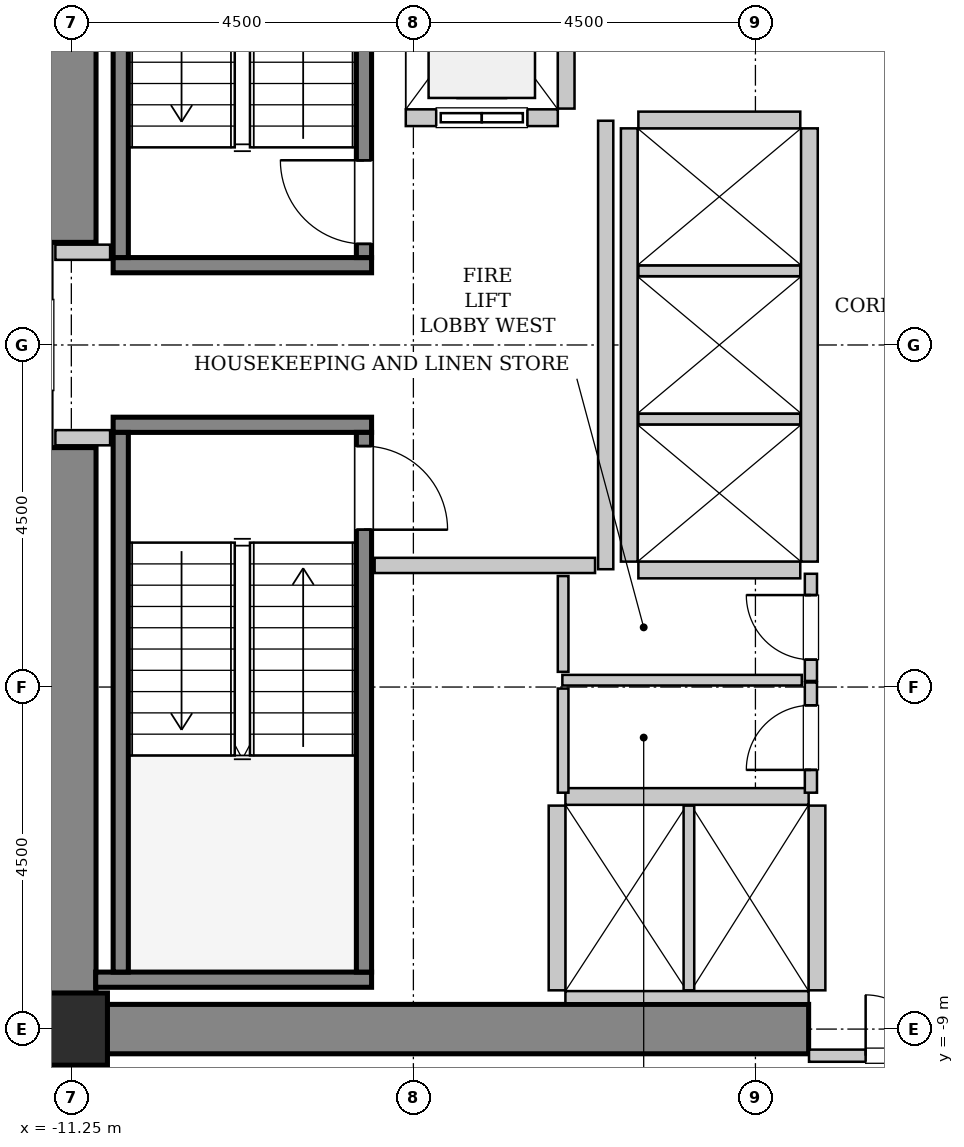
"""IFC4 building model, lengths in metres.
Left out: names, types, materials, properties, quantities, classifications, styles, units other than length and angle.
Written with IfcOpenShell. Run it as: python <this file> out.ifc"""

import sys

from ifc_helpers import new_model, si_unit, direction, frame, frame_2d, origin, origin_2d, place, context, subcontext, project, spatial, rectangle, hollow_rectangle, extrude, source, transform, mapped, element, fill, save


model = new_model("IFC4")
c1 = context("Model", 3, precision=1e-05, world=origin(), true_north=direction((0.0, 1.0)))
c2 = subcontext(c1, "Body", "Model", "MODEL_VIEW")
j1 = project(units=[si_unit("LENGTHUNIT", "METRE"), si_unit("PLANEANGLEUNIT", "RADIAN")], contexts=[c1])
p1 = place(None, origin())
s1 = spatial("IfcSite", under=j1, at=p1, CompositionType="ELEMENT")
p2 = place(p1, origin())
s2 = spatial("IfcBuilding", under=s1, at=p2, CompositionType="ELEMENT")
p3 = place(p2, frame((0.0, 0.0, 40.6)))
s3 = spatial("IfcBuildingStorey", under=s2, at=p3, CompositionType="ELEMENT", Elevation=40.6)
m1 = source(origin(), c2, "Body", "SweptSolid", [
    extrude(rectangle(XDim=10.025, YDim=0.65, at=frame_2d((5.012, 0.0))), origin(), (0.0, 0.0, 1.0), 3.8),
])
p4 = place(p3, frame((-11.575, -9.0, 0.0), z_axis=(0.0, 0.0, 1.0), x_axis=(1.0, 0.0, 0.0)))
e1 = element("IfcWall", 1, at=p4, inside=s3, PredefinedType="SHEAR", context=c2, shape_type="MappedRepresentation", body=[
    mapped(m1, transform((0.0, 0.0, 0.0), x_axis=(1.0, 0.0, 0.0), y_axis=(0.0, 1.0, 0.0), z_axis=(0.0, 0.0, 1.0), scale=1.0)),
])
m2 = source(origin(), c2, "Body", "SweptSolid", [
    extrude(rectangle(XDim=7.325, YDim=0.65, at=frame_2d((3.663, 0.0))), origin(), (0.0, 0.0, 1.0), 3.8),
])
for number, where, z_axis, x_axis in (
    (2, (-11.25, -8.675, 0.0), (0.0, 0.0, 1.0), (0.0, 1.0, 0.0)),
    (3, (-11.25, 1.35, 0.0), (0.0, 0.0, 1.0), (0.0, 1.0, 0.0)),
):
    element("IfcWall", number, at=place(p3, frame(where, z_axis=z_axis, x_axis=x_axis)), inside=s3, PredefinedType="SHEAR", context=c2, shape_type="MappedRepresentation", body=[
        mapped(m2, transform((0.0, 0.0, 0.0), x_axis=(1.0, 0.0, 0.0), y_axis=(0.0, 1.0, 0.0), z_axis=(0.0, 0.0, 1.0), scale=1.0)),
    ])
m3 = source(origin(), c2, "Body", "SweptSolid", [
    extrude(hollow_rectangle(XDim=0.95, YDim=0.95, WallThickness=0.045, InnerFilletRadius=0.045, OuterFilletRadius=0.09, at=origin_2d()), origin(), (0.0, 0.0, 1.0), 3.8),
])
p5 = place(p3, frame((-11.25, -9.0, 0.0), z_axis=(0.0, 0.0, 1.0), x_axis=(1.0, 0.0, 0.0)))
e4 = element("IfcColumn", 4, at=p5, inside=s3, PredefinedType="COLUMN", context=c2, shape_type="MappedRepresentation", body=[
    mapped(m3, transform((0.0, 0.0, 0.0), x_axis=(1.0, 0.0, 0.0), y_axis=(0.0, 1.0, 0.0), z_axis=(0.0, 0.0, 1.0), scale=1.0)),
])
m4 = source(origin(), c2, "Body", "SweptSolid", [
    extrude(rectangle(XDim=3.4, YDim=0.2, at=frame_2d((1.7, 0.0))), origin(), (0.0, 0.0, 1.0), 3.8),
])
p6 = place(p3, frame((-7.3, 1.05, 0.0), z_axis=(0.0, 0.0, 1.0), x_axis=(-1.0, 0.0, 0.0)))
e5 = element("IfcWall", 5, at=p6, inside=s3, PredefinedType="SOLIDWALL", context=c2, shape_type="MappedRepresentation", body=[
    mapped(m4, transform((0.0, 0.0, 0.0), x_axis=(1.0, 0.0, 0.0), y_axis=(0.0, 1.0, 0.0), z_axis=(0.0, 0.0, 1.0), scale=1.0)),
])
m5 = source(origin(), c2, "Body", "SweptSolid", [
    extrude(rectangle(XDim=7.1, YDim=0.2, at=frame_2d((3.55, 0.0))), origin(), (0.0, 0.0, 1.0), 3.8),
])
p7 = place(p3, frame((-7.4, 1.15, 0.0), z_axis=(0.0, 0.0, 1.0), x_axis=(0.0, 1.0, 0.0)))
e6 = element("IfcWall", 6, at=p7, inside=s3, PredefinedType="SOLIDWALL", context=c2, shape_type="MappedRepresentation", body=[
    mapped(m5, transform((0.0, 0.0, 0.0), x_axis=(1.0, 0.0, 0.0), y_axis=(0.0, 1.0, 0.0), z_axis=(0.0, 0.0, 1.0), scale=1.0)),
])
p8 = place(p7, frame((0.18, 0.0, 0.0)))
e7 = element("IfcOpeningElement", 7, at=p8, cuts=e6, PredefinedType="OPENING", context=c2, shape_type="SweptSolid", body=[
    extrude(rectangle(XDim=1.1, YDim=2.15, at=frame_2d((0.55, 1.075))), frame((0.0, 0.11, 0.0), z_axis=(0.0, -1.0, 0.0), x_axis=(1.0, 0.0, 0.0)), (0.0, 0.0, 1.0), 0.22),
])
p9 = place(p3, frame((-10.6, 1.15, 0.0), z_axis=(0.0, 0.0, 1.0), x_axis=(0.0, 1.0, 0.0)))
e8 = element("IfcWall", 8, at=p9, inside=s3, PredefinedType="SOLIDWALL", context=c2, shape_type="MappedRepresentation", body=[
    mapped(m5, transform((0.0, 0.0, 0.0), x_axis=(1.0, 0.0, 0.0), y_axis=(0.0, 1.0, 0.0), z_axis=(0.0, 0.0, 1.0), scale=1.0)),
])
p10 = place(p3, frame((-10.7, -1.05, 0.0), z_axis=(0.0, 0.0, 1.0), x_axis=(1.0, 0.0, 0.0)))
e9 = element("IfcWall", 9, at=p10, inside=s3, PredefinedType="SOLIDWALL", context=c2, shape_type="MappedRepresentation", body=[
    mapped(m4, transform((0.0, 0.0, 0.0), x_axis=(1.0, 0.0, 0.0), y_axis=(0.0, 1.0, 0.0), z_axis=(0.0, 0.0, 1.0), scale=1.0)),
])
m6 = source(origin(), c2, "Body", "SweptSolid", [
    extrude(rectangle(XDim=3.63, YDim=0.2, at=frame_2d((1.815, 0.0))), origin(), (0.0, 0.0, 1.0), 3.8),
])
p11 = place(p3, frame((-10.93, -8.35, 0.0), z_axis=(0.0, 0.0, 1.0), x_axis=(1.0, 0.0, 0.0)))
e10 = element("IfcWall", 10, at=p11, inside=s3, PredefinedType="SOLIDWALL", context=c2, shape_type="MappedRepresentation", body=[
    mapped(m6, transform((0.0, 0.0, 0.0), x_axis=(1.0, 0.0, 0.0), y_axis=(0.0, 1.0, 0.0), z_axis=(0.0, 0.0, 1.0), scale=1.0)),
])
p12 = place(p3, frame((-10.6, -1.15, 0.0), z_axis=(0.0, 0.0, 1.0), x_axis=(0.0, -1.0, 0.0)))
e11 = element("IfcWall", 11, at=p12, inside=s3, PredefinedType="SOLIDWALL", context=c2, shape_type="MappedRepresentation", body=[
    mapped(m5, transform((0.0, 0.0, 0.0), x_axis=(1.0, 0.0, 0.0), y_axis=(0.0, 1.0, 0.0), z_axis=(0.0, 0.0, 1.0), scale=1.0)),
])
p13 = place(p3, frame((-7.4, -1.15, 0.0), z_axis=(0.0, 0.0, 1.0), x_axis=(0.0, -1.0, 0.0)))
e12 = element("IfcWall", 12, at=p13, inside=s3, PredefinedType="SOLIDWALL", context=c2, shape_type="MappedRepresentation", body=[
    mapped(m5, transform((0.0, 0.0, 0.0), x_axis=(1.0, 0.0, 0.0), y_axis=(0.0, 1.0, 0.0), z_axis=(0.0, 0.0, 1.0), scale=1.0)),
])
p14 = place(p13, frame((0.18, 0.0, 0.0)))
e13 = element("IfcOpeningElement", 13, at=p14, cuts=e12, PredefinedType="OPENING", context=c2, shape_type="SweptSolid", body=[
    extrude(rectangle(XDim=1.1, YDim=2.15, at=frame_2d((0.55, 1.075))), frame((0.0, 0.11, 0.0), z_axis=(0.0, -1.0, 0.0), x_axis=(1.0, 0.0, 0.0)), (0.0, 0.0, 1.0), 0.22),
])
m7 = source(origin(), c2, "Body", "SweptSolid", [
    extrude(rectangle(XDim=2.0, YDim=0.22, at=frame_2d((1.0, 0.0))), origin(), (0.0, 0.0, 1.0), 3.535),
])
p15 = place(p3, frame((-6.85, 2.99, 0.0), z_axis=(0.0, 0.0, 1.0), x_axis=(1.0, 0.0, 0.0)))
e14 = element("IfcWall", 14, at=p15, inside=s3, PredefinedType="SOLIDWALL", context=c2, shape_type="MappedRepresentation", body=[
    mapped(m7, transform((0.0, 0.0, 0.0), x_axis=(1.0, 0.0, 0.0), y_axis=(0.0, 1.0, 0.0), z_axis=(0.0, 0.0, 1.0), scale=1.0)),
])
p16 = place(p15, frame((0.4, 0.0, 0.0)))
e15 = element("IfcOpeningElement", 15, at=p16, cuts=e14, PredefinedType="OPENING", context=c2, shape_type="SweptSolid", body=[
    extrude(rectangle(XDim=1.2, YDim=2.2, at=frame_2d((0.6, 1.1))), frame((0.0, 0.12, 0.0), z_axis=(0.0, -1.0, 0.0), x_axis=(1.0, 0.0, 0.0)), (0.0, 0.0, 1.0), 0.24),
])
m8 = source(origin(), c2, "Body", "SweptSolid", [
    extrude(rectangle(XDim=2.68, YDim=0.22, at=frame_2d((1.34, 0.0))), origin(), (0.0, 0.0, 1.0), 3.535),
])
p17 = place(p3, frame((-4.74, 3.11, 0.0), z_axis=(0.0, 0.0, 1.0), x_axis=(0.0, 1.0, 0.0)))
e16 = element("IfcWall", 16, at=p17, inside=s3, PredefinedType="SOLIDWALL", context=c2, shape_type="MappedRepresentation", body=[
    mapped(m8, transform((0.0, 0.0, 0.0), x_axis=(1.0, 0.0, 0.0), y_axis=(0.0, 1.0, 0.0), z_axis=(0.0, 0.0, 1.0), scale=1.0)),
])
m9 = source(origin(), c2, "Body", "SweptSolid", [
    extrude(rectangle(XDim=3.2, YDim=0.22, at=frame_2d((1.6, 0.0))), origin(), (0.0, 0.0, 1.0), 3.535),
])
p18 = place(p3, frame((-1.55, -5.94, 0.0), z_axis=(0.0, 0.0, 1.0), x_axis=(-1.0, 0.0, 0.0)))
e17 = element("IfcWall", 17, at=p18, inside=s3, PredefinedType="SOLIDWALL", context=c2, shape_type="MappedRepresentation", body=[
    mapped(m9, transform((0.0, 0.0, 0.0), x_axis=(1.0, 0.0, 0.0), y_axis=(0.0, 1.0, 0.0), z_axis=(0.0, 0.0, 1.0), scale=1.0)),
])
m10 = source(origin(), c2, "Body", "SweptSolid", [
    extrude(rectangle(XDim=3.2, YDim=0.16, at=frame_2d((1.6, 0.0))), origin(), (0.0, 0.0, 1.0), 2.425),
])
p19 = place(p3, frame((-4.75, -8.58, 0.0), z_axis=(0.0, 0.0, 1.0), x_axis=(1.0, 0.0, 0.0)))
e18 = element("IfcWall", 18, at=p19, inside=s3, PredefinedType="PARTITIONING", context=c2, shape_type="MappedRepresentation", body=[
    mapped(m10, transform((0.0, 0.0, 0.0), x_axis=(1.0, 0.0, 0.0), y_axis=(0.0, 1.0, 0.0), z_axis=(0.0, 0.0, 1.0), scale=1.0)),
])
m11 = source(origin(), c2, "Body", "SweptSolid", [
    extrude(rectangle(XDim=2.43, YDim=0.22, at=frame_2d((1.215, 0.0))), origin(), (0.0, 0.0, 1.0), 3.535),
])
p20 = place(p3, frame((-4.86, -6.06, 0.0), z_axis=(0.0, 0.0, 1.0), x_axis=(0.0, -1.0, 0.0)))
e19 = element("IfcWall", 19, at=p20, inside=s3, PredefinedType="SOLIDWALL", context=c2, shape_type="MappedRepresentation", body=[
    mapped(m11, transform((0.0, 0.0, 0.0), x_axis=(1.0, 0.0, 0.0), y_axis=(0.0, 1.0, 0.0), z_axis=(0.0, 0.0, 1.0), scale=1.0)),
])
m12 = source(origin(), c2, "Body", "SweptSolid", [
    extrude(rectangle(XDim=2.43, YDim=0.14, at=frame_2d((1.215, 0.0))), origin(), (0.0, 0.0, 1.0), 3.535),
])
p21 = place(p3, frame((-3.125, -8.49, 0.0), z_axis=(0.0, 0.0, 1.0), x_axis=(0.0, 1.0, 0.0)))
e20 = element("IfcWall", 20, at=p21, inside=s3, PredefinedType="PARTITIONING", context=c2, shape_type="MappedRepresentation", body=[
    mapped(m12, transform((0.0, 0.0, 0.0), x_axis=(1.0, 0.0, 0.0), y_axis=(0.0, 1.0, 0.0), z_axis=(0.0, 0.0, 1.0), scale=1.0)),
])
p22 = place(p3, frame((-1.44, -8.49, 0.0), z_axis=(0.0, 0.0, 1.0), x_axis=(0.0, 1.0, 0.0)))
e21 = element("IfcWall", 21, at=p22, inside=s3, PredefinedType="SOLIDWALL", context=c2, shape_type="MappedRepresentation", body=[
    mapped(m11, transform((0.0, 0.0, 0.0), x_axis=(1.0, 0.0, 0.0), y_axis=(0.0, 1.0, 0.0), z_axis=(0.0, 0.0, 1.0), scale=1.0)),
])
m13 = source(origin(), c2, "Body", "SweptSolid", [
    extrude(rectangle(XDim=5.7, YDim=0.22, at=frame_2d((2.85, 0.0))), origin(), (0.0, 0.0, 1.0), 3.535),
])
for number, where, z_axis, x_axis in (
    (22, (-1.54, -2.85, 0.0), (0.0, 0.0, 1.0), (0.0, 1.0, 0.0)),
    (23, (-3.91, 2.85, 0.0), (0.0, 0.0, 1.0), (0.0, -1.0, 0.0)),
):
    element("IfcWall", number, at=place(p3, frame(where, z_axis=z_axis, x_axis=x_axis)), inside=s3, PredefinedType="SOLIDWALL", context=c2, shape_type="MappedRepresentation", body=[
        mapped(m13, transform((0.0, 0.0, 0.0), x_axis=(1.0, 0.0, 0.0), y_axis=(0.0, 1.0, 0.0), z_axis=(0.0, 0.0, 1.0), scale=1.0)),
    ])
m14 = source(origin(), c2, "Body", "SweptSolid", [
    extrude(rectangle(XDim=2.13, YDim=0.22, at=frame_2d((1.065, 0.0))), origin(), (0.0, 0.0, 1.0), 3.535),
])
p23 = place(p3, frame((-3.79, -2.96, 0.0), z_axis=(0.0, 0.0, 1.0), x_axis=(1.0, 0.0, 0.0)))
e24 = element("IfcWall", 24, at=p23, inside=s3, PredefinedType="SOLIDWALL", context=c2, shape_type="MappedRepresentation", body=[
    mapped(m14, transform((0.0, 0.0, 0.0), x_axis=(1.0, 0.0, 0.0), y_axis=(0.0, 1.0, 0.0), z_axis=(0.0, 0.0, 1.0), scale=1.0)),
])
m15 = source(origin(), c2, "Body", "SweptSolid", [
    extrude(rectangle(XDim=2.13, YDim=0.14, at=frame_2d((1.065, 0.0))), origin(), (0.0, 0.0, 1.0), 3.535),
])
for number, where, z_axis, x_axis in (
    (25, (-3.79, -0.975, 0.0), (0.0, 0.0, 1.0), (1.0, 0.0, 0.0)),
    (26, (-3.79, 0.975, 0.0), (0.0, 0.0, 1.0), (1.0, 0.0, 0.0)),
):
    element("IfcWall", number, at=place(p3, frame(where, z_axis=z_axis, x_axis=x_axis)), inside=s3, PredefinedType="PARTITIONING", context=c2, shape_type="MappedRepresentation", body=[
        mapped(m15, transform((0.0, 0.0, 0.0), x_axis=(1.0, 0.0, 0.0), y_axis=(0.0, 1.0, 0.0), z_axis=(0.0, 0.0, 1.0), scale=1.0)),
    ])
p24 = place(p3, frame((-1.66, 2.96, 0.0), z_axis=(0.0, 0.0, 1.0), x_axis=(-1.0, 0.0, 0.0)))
e27 = element("IfcWall", 27, at=p24, inside=s3, PredefinedType="SOLIDWALL", context=c2, shape_type="MappedRepresentation", body=[
    mapped(m14, transform((0.0, 0.0, 0.0), x_axis=(1.0, 0.0, 0.0), y_axis=(0.0, 1.0, 0.0), z_axis=(0.0, 0.0, 1.0), scale=1.0)),
])
m16 = source(origin(), c2, "Body", "SweptSolid", [
    extrude(rectangle(XDim=5.9, YDim=0.2, at=frame_2d((2.95, 0.0))), origin(), (0.0, 0.0, 1.0), 3.535),
])
p25 = place(p3, frame((-4.22, -2.95, 0.0), z_axis=(0.0, 0.0, 1.0), x_axis=(0.0, 1.0, 0.0)))
e28 = element("IfcWall", 28, at=p25, inside=s3, PredefinedType="PARTITIONING", context=c2, shape_type="MappedRepresentation", body=[
    mapped(m16, transform((0.0, 0.0, 0.0), x_axis=(1.0, 0.0, 0.0), y_axis=(0.0, 1.0, 0.0), z_axis=(0.0, 0.0, 1.0), scale=1.0)),
])
m17 = source(origin(), c2, "Body", "SweptSolid", [
    extrude(rectangle(XDim=2.9, YDim=0.2, at=frame_2d((1.45, 0.0))), origin(), (0.0, 0.0, 1.0), 3.535),
])
p26 = place(p3, frame((-7.26, -2.9, 0.0), z_axis=(0.0, 0.0, 1.0), x_axis=(1.0, 0.0, 0.0)))
e29 = element("IfcWall", 29, at=p26, inside=s3, PredefinedType="PARTITIONING", context=c2, shape_type="MappedRepresentation", body=[
    mapped(m17, transform((0.0, 0.0, 0.0), x_axis=(1.0, 0.0, 0.0), y_axis=(0.0, 1.0, 0.0), z_axis=(0.0, 0.0, 1.0), scale=1.0)),
])
m18 = source(origin(), c2, "Body", "SweptSolid", [
    extrude(rectangle(XDim=0.72, YDim=0.2, at=frame_2d((0.36, 0.0))), origin(), (0.0, 0.0, 1.0), 3.535),
])
for number, where, z_axis, x_axis in (
    (30, (-11.46, 1.22, 0.0), (0.0, 0.0, 1.0), (1.0, 0.0, 0.0)),
    (31, (-11.46, -1.22, 0.0), (0.0, 0.0, 1.0), (1.0, 0.0, 0.0)),
):
    element("IfcWall", number, at=place(p3, frame(where, z_axis=z_axis, x_axis=x_axis)), inside=s3, PredefinedType="PARTITIONING", context=c2, shape_type="MappedRepresentation", body=[
        mapped(m18, transform((0.0, 0.0, 0.0), x_axis=(1.0, 0.0, 0.0), y_axis=(0.0, 1.0, 0.0), z_axis=(0.0, 0.0, 1.0), scale=1.0)),
    ])
m19 = source(origin(), c2, "Body", "SweptSolid", [
    extrude(rectangle(XDim=3.09, YDim=0.16, at=frame_2d((1.545, 0.0))), origin(), (0.0, 0.0, 1.0), 2.425),
])
p27 = place(p3, frame((-1.545, -9.35, 0.0), z_axis=(0.0, 0.0, 1.0), x_axis=(1.0, 0.0, 0.0)))
e32 = element("IfcWall", 32, at=p27, inside=s3, PredefinedType="PARTITIONING", context=c2, shape_type="MappedRepresentation", body=[
    mapped(m19, transform((0.0, 0.0, 0.0), x_axis=(1.0, 0.0, 0.0), y_axis=(0.0, 1.0, 0.0), z_axis=(0.0, 0.0, 1.0), scale=1.0)),
])
p28 = place(p27, frame((0.745, 0.0, 0.0)))
e33 = element("IfcOpeningElement", 33, at=p28, cuts=e32, PredefinedType="OPENING", context=c2, shape_type="SweptSolid", body=[
    extrude(rectangle(XDim=1.6, YDim=2.3, at=frame_2d((0.8, 1.15))), frame((0.0, 0.09, 0.0), z_axis=(0.0, -1.0, 0.0), x_axis=(1.0, 0.0, 0.0)), (0.0, 0.0, 1.0), 0.18),
])
m20 = source(origin(), c2, "Body", "SweptSolid", [
    extrude(rectangle(XDim=1.41, YDim=0.16, at=frame_2d((0.705, 0.0))), origin(), (0.0, 0.0, 1.0), 3.535),
])
p29 = place(p3, frame((-1.52, -4.42, 0.0), z_axis=(0.0, 0.0, 1.0), x_axis=(0.0, 1.0, 0.0)))
e34 = element("IfcWall", 34, at=p29, inside=s3, PredefinedType="PARTITIONING", context=c2, shape_type="MappedRepresentation", body=[
    mapped(m20, transform((0.0, 0.0, 0.0), x_axis=(1.0, 0.0, 0.0), y_axis=(0.0, 1.0, 0.0), z_axis=(0.0, 0.0, 1.0), scale=1.0)),
])
p30 = place(p29, frame((0.28, 0.0, 0.0)))
e35 = element("IfcOpeningElement", 35, at=p30, cuts=e34, PredefinedType="OPENING", context=c2, shape_type="SweptSolid", body=[
    extrude(rectangle(XDim=0.85, YDim=2.1, at=frame_2d((0.425, 1.05))), frame((0.0, 0.09, 0.0), z_axis=(0.0, -1.0, 0.0), x_axis=(1.0, 0.0, 0.0)), (0.0, 0.0, 1.0), 0.18),
])
m21 = source(origin(), c2, "Body", "SweptSolid", [
    extrude(rectangle(XDim=3.15, YDim=0.14, at=frame_2d((1.575, 0.0))), origin(), (0.0, 0.0, 1.0), 3.535),
])
p31 = place(p3, frame((-4.79, -4.41, 0.0), z_axis=(0.0, 0.0, 1.0), x_axis=(1.0, 0.0, 0.0)))
e36 = element("IfcWall", 36, at=p31, inside=s3, PredefinedType="PARTITIONING", context=c2, shape_type="MappedRepresentation", body=[
    mapped(m21, transform((0.0, 0.0, 0.0), x_axis=(1.0, 0.0, 0.0), y_axis=(0.0, 1.0, 0.0), z_axis=(0.0, 0.0, 1.0), scale=1.0)),
])
m22 = source(origin(), c2, "Body", "SweptSolid", [
    extrude(rectangle(XDim=1.26, YDim=0.14, at=frame_2d((0.63, 0.0))), origin(), (0.0, 0.0, 1.0), 3.535),
])
p32 = place(p3, frame((-4.78, -4.3, 0.0), z_axis=(0.0, 0.0, 1.0), x_axis=(0.0, 1.0, 0.0)))
e37 = element("IfcWall", 37, at=p32, inside=s3, PredefinedType="PARTITIONING", context=c2, shape_type="MappedRepresentation", body=[
    mapped(m22, transform((0.0, 0.0, 0.0), x_axis=(1.0, 0.0, 0.0), y_axis=(0.0, 1.0, 0.0), z_axis=(0.0, 0.0, 1.0), scale=1.0)),
])
m23 = source(origin(), c2, "Body", "SweptSolid", [
    extrude(rectangle(XDim=1.45, YDim=0.16, at=frame_2d((0.725, 0.0))), origin(), (0.0, 0.0, 1.0), 3.535),
])
p33 = place(p3, frame((-1.52, -5.89, 0.0), z_axis=(0.0, 0.0, 1.0), x_axis=(0.0, 1.0, 0.0)))
e38 = element("IfcWall", 38, at=p33, inside=s3, PredefinedType="PARTITIONING", context=c2, shape_type="MappedRepresentation", body=[
    mapped(m23, transform((0.0, 0.0, 0.0), x_axis=(1.0, 0.0, 0.0), y_axis=(0.0, 1.0, 0.0), z_axis=(0.0, 0.0, 1.0), scale=1.0)),
])
p34 = place(p33, frame((0.3, 0.0, 0.0)))
e39 = element("IfcOpeningElement", 39, at=p34, cuts=e38, PredefinedType="OPENING", context=c2, shape_type="SweptSolid", body=[
    extrude(rectangle(XDim=0.85, YDim=2.1, at=frame_2d((0.425, 1.05))), frame((0.0, 0.09, 0.0), z_axis=(0.0, -1.0, 0.0), x_axis=(1.0, 0.0, 0.0)), (0.0, 0.0, 1.0), 0.18),
])
m24 = source(origin(), c2, "Body", "SweptSolid", [
    extrude(rectangle(XDim=1.37, YDim=0.14, at=frame_2d((0.685, 0.0))), origin(), (0.0, 0.0, 1.0), 3.535),
])
p35 = place(p3, frame((-4.78, -5.89, 0.0), z_axis=(0.0, 0.0, 1.0), x_axis=(0.0, 1.0, 0.0)))
e40 = element("IfcWall", 40, at=p35, inside=s3, PredefinedType="PARTITIONING", context=c2, shape_type="MappedRepresentation", body=[
    mapped(m24, transform((0.0, 0.0, 0.0), x_axis=(1.0, 0.0, 0.0), y_axis=(0.0, 1.0, 0.0), z_axis=(0.0, 0.0, 1.0), scale=1.0)),
])
m25 = source(origin(), c2, "Body", "SweptSolid", [
    extrude(rectangle(XDim=1.1, YDim=2.15, at=frame_2d((0.55, 1.075))), frame((0.0, 0.025, 0.0), z_axis=(0.0, -1.0, 0.0), x_axis=(1.0, 0.0, 0.0)), (0.0, 0.0, 1.0), 0.05),
])
p36 = place(p8, origin())
e41 = element("IfcDoor", 41, at=p36, inside=s3, OperationType="SINGLE_SWING_RIGHT", PredefinedType="DOOR", context=c2, shape_type="MappedRepresentation", body=[
    mapped(m25, transform((0.0, 0.0, 0.0), x_axis=(1.0, 0.0, 0.0), y_axis=(0.0, 1.0, 0.0), z_axis=(0.0, 0.0, 1.0), scale=1.0)),
])
fill(e7, e41)
p37 = place(p14, origin())
e42 = element("IfcDoor", 42, at=p37, inside=s3, OperationType="SINGLE_SWING_RIGHT", PredefinedType="DOOR", context=c2, shape_type="MappedRepresentation", body=[
    mapped(m25, transform((0.0, 0.0, 0.0), x_axis=(1.0, 0.0, 0.0), y_axis=(0.0, 1.0, 0.0), z_axis=(0.0, 0.0, 1.0), scale=1.0)),
])
fill(e13, e42)
m26 = source(origin(), c2, "Body", "SweptSolid", [
    extrude(rectangle(XDim=1.2, YDim=2.2, at=frame_2d((0.6, 1.1))), frame((0.0, 0.025, 0.0), z_axis=(0.0, -1.0, 0.0), x_axis=(1.0, 0.0, 0.0)), (0.0, 0.0, 1.0), 0.05),
])
p38 = place(p16, origin())
e43 = element("IfcDoor", 43, at=p38, inside=s3, OperationType="SLIDING_TO_LEFT", PredefinedType="DOOR", context=c2, shape_type="MappedRepresentation", body=[
    mapped(m26, transform((0.0, 0.0, 0.0), x_axis=(1.0, 0.0, 0.0), y_axis=(0.0, 1.0, 0.0), z_axis=(0.0, 0.0, 1.0), scale=1.0)),
])
fill(e15, e43)
m27 = source(origin(), c2, "Body", "SweptSolid", [
    extrude(rectangle(XDim=1.6, YDim=2.3, at=frame_2d((0.8, 1.15))), frame((0.0, 0.025, 0.0), z_axis=(0.0, -1.0, 0.0), x_axis=(1.0, 0.0, 0.0)), (0.0, 0.0, 1.0), 0.05),
])
p39 = place(p28, origin())
e44 = element("IfcDoor", 44, at=p39, inside=s3, OperationType="DOUBLE_DOOR_SINGLE_SWING", PredefinedType="DOOR", context=c2, shape_type="MappedRepresentation", body=[
    mapped(m27, transform((0.0, 0.0, 0.0), x_axis=(1.0, 0.0, 0.0), y_axis=(0.0, 1.0, 0.0), z_axis=(0.0, 0.0, 1.0), scale=1.0)),
])
fill(e33, e44)
m28 = source(origin(), c2, "Body", "SweptSolid", [
    extrude(rectangle(XDim=0.85, YDim=2.1, at=frame_2d((0.425, 1.05))), frame((0.0, 0.025, 0.0), z_axis=(0.0, -1.0, 0.0), x_axis=(1.0, 0.0, 0.0)), (0.0, 0.0, 1.0), 0.05),
])
p40 = place(p30, origin())
e45 = element("IfcDoor", 45, at=p40, inside=s3, OperationType="SINGLE_SWING_RIGHT", PredefinedType="DOOR", context=c2, shape_type="MappedRepresentation", body=[
    mapped(m28, transform((0.0, 0.0, 0.0), x_axis=(1.0, 0.0, 0.0), y_axis=(0.0, 1.0, 0.0), z_axis=(0.0, 0.0, 1.0), scale=1.0)),
])
fill(e35, e45)
p41 = place(p34, origin())
e46 = element("IfcDoor", 46, at=p41, inside=s3, OperationType="SINGLE_SWING_LEFT", PredefinedType="DOOR", context=c2, shape_type="MappedRepresentation", body=[
    mapped(m28, transform((0.0, 0.0, 0.0), x_axis=(1.0, 0.0, 0.0), y_axis=(0.0, 1.0, 0.0), z_axis=(0.0, 0.0, 1.0), scale=1.0)),
])
fill(e39, e46)
save(model, sys.argv[1])
